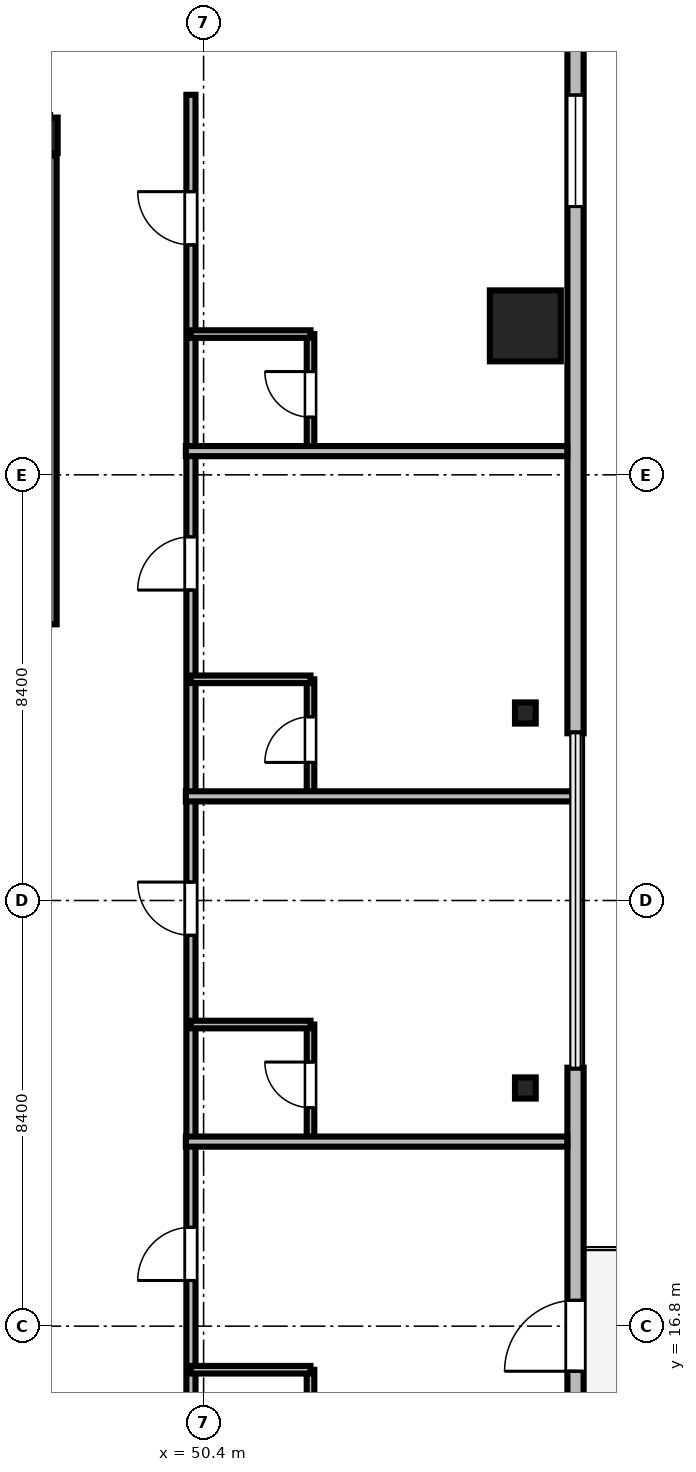
"""IFC4 building model, lengths in metres.
Left out: names, types, materials, properties, quantities, classifications, styles, units other than length and angle.
Written with IfcOpenShell. Run it as: python <this file> out.ifc"""

import sys

from ifc_helpers import new_model, si_unit, direction, frame, frame_2d, origin, origin_2d, place, context, subcontext, project, spatial, rectangle, i_section, extrude, source, transform, mapped, element, fill, save


model = new_model("IFC4")
c1 = context("Model", 3, precision=1e-05, world=origin(), true_north=direction((0.0, 1.0)))
c2 = subcontext(c1, "Body", "Model", "MODEL_VIEW")
j1 = project(units=[si_unit("LENGTHUNIT", "METRE"), si_unit("PLANEANGLEUNIT", "RADIAN")], contexts=[c1])
p1 = place(None, origin())
s1 = spatial("IfcSite", under=j1, at=p1, CompositionType="ELEMENT")
p2 = place(p1, origin())
s2 = spatial("IfcBuilding", under=s1, at=p2, CompositionType="ELEMENT")
p3 = place(p2, frame((0.0, 0.0, 229.8)))
s3 = spatial("IfcBuildingStorey", under=s2, at=p3, CompositionType="ELEMENT", Elevation=229.8)
m1 = source(origin(), c2, "Body", "SweptSolid", [
    extrude(i_section(OverallWidth=0.3, OverallDepth=0.7, WebThickness=0.017, FlangeThickness=0.032, FilletRadius=0.027, at=origin_2d()), origin(), (0.0, 0.0, 1.0), 3.53),
])
p4 = place(p3, frame((47.37, 40.3, 0.0), z_axis=(0.0, 0.0, 1.0), x_axis=(1.0, 0.0, 0.0)))
e1 = element("IfcColumn", 1, at=p4, inside=s3, PredefinedType="COLUMN", context=c2, shape_type="MappedRepresentation", body=[
    mapped(m1, transform((0.0, 0.0, 0.0), scale=1.0)),
])
m2 = source(origin(), c2, "Body", "SweptSolid", [
    extrude(rectangle(XDim=1.4, YDim=1.4, at=origin_2d()), origin(), (0.0, 0.0, 1.0), 3.53),
])
p5 = place(p3, frame((56.75, 36.54, 0.0), z_axis=(0.0, 0.0, 1.0), x_axis=(1.0, 0.0, 0.0)))
e2 = element("IfcColumn", 2, at=p5, inside=s3, PredefinedType="COLUMN", context=c2, shape_type="MappedRepresentation", body=[
    mapped(m2, transform((0.0, 0.0, 0.0), scale=1.0)),
])
m3 = source(origin(), c2, "Body", "SweptSolid", [
    extrude(i_section(OverallWidth=0.409, OverallDepth=0.417, WebThickness=0.021, FlangeThickness=0.033, FilletRadius=0.015, at=origin_2d()), origin(), (0.0, 0.0, 1.0), 3.53),
])
for number, where, z_axis, x_axis in (
    (3, (56.75, 21.5, 0.0), (0.0, 0.0, 1.0), (1.0, 0.0, 0.0)),
    (4, (56.75, 28.9, 0.0), (0.0, 0.0, 1.0), (1.0, 0.0, 0.0)),
):
    element("IfcColumn", number, at=place(p3, frame(where, z_axis=z_axis, x_axis=x_axis)), inside=s3, PredefinedType="COLUMN", context=c2, shape_type="MappedRepresentation", body=[
        mapped(m3, transform((0.0, 0.0, 0.0), scale=1.0)),
    ])
m4 = source(origin(), c2, "Body", "SweptSolid", [
    extrude(rectangle(XDim=15.6, YDim=0.32, at=frame_2d((7.8, 0.0))), origin(), (0.0, 0.0, 1.0), 3.53),
])
p6 = place(p3, frame((57.74, 6.3, 0.0), z_axis=(0.0, 0.0, 1.0), x_axis=(0.0, 1.0, 0.0)))
e5 = element("IfcWall", 5, at=p6, inside=s3, PredefinedType="SOLIDWALL", context=c2, shape_type="MappedRepresentation", body=[
    mapped(m4, transform((0.0, 0.0, 0.0), scale=1.0)),
])
m5 = source(origin(), c2, "Body", "SweptSolid", [
    extrude(rectangle(XDim=1.4, YDim=2.3, at=frame_2d((0.7, 1.15))), frame((0.0, 0.17, 0.0), z_axis=(0.0, -1.0, 0.0), x_axis=(1.0, 0.0, 0.0)), (0.0, 0.0, 1.0), 0.34),
])
p7 = place(p6, frame((9.61, 0.0, 0.0)))
e6 = element("IfcOpeningElement", 6, at=p7, cuts=e5, PredefinedType="OPENING", context=c2, shape_type="MappedRepresentation", body=[
    mapped(m5, transform((0.0, 0.0, 0.0), scale=1.0)),
])
m6 = source(origin(), c2, "Body", "SweptSolid", [
    extrude(rectangle(XDim=2.2, YDim=2.4, at=frame_2d((1.1, 1.2))), frame((0.0, 0.17, 0.0), z_axis=(0.0, -1.0, 0.0), x_axis=(1.0, 0.0, 0.0)), (0.0, 0.0, 1.0), 0.34),
])
p8 = place(p6, frame((3.005, 0.0, 0.72)))
e7 = element("IfcOpeningElement", 7, at=p8, cuts=e5, PredefinedType="OPENING", context=c2, shape_type="MappedRepresentation", body=[
    mapped(m6, transform((0.0, 0.0, 0.0), scale=1.0)),
])
m7 = source(origin(), c2, "Body", "SweptSolid", [
    extrude(rectangle(XDim=15.6, YDim=0.32, at=frame_2d((7.8, 0.0))), origin(), (0.0, 0.0, 1.0), 3.53),
])
p9 = place(p3, frame((57.74, 28.5, 0.0), z_axis=(0.0, 0.0, 1.0), x_axis=(0.0, 1.0, 0.0)))
e8 = element("IfcWall", 8, at=p9, inside=s3, PredefinedType="SOLIDWALL", context=c2, shape_type="MappedRepresentation", body=[
    mapped(m7, transform((0.0, 0.0, 0.0), scale=1.0)),
])
p10 = place(p9, frame((10.395, 0.0, 0.72)))
e9 = element("IfcOpeningElement", 9, at=p10, cuts=e8, PredefinedType="OPENING", context=c2, shape_type="MappedRepresentation", body=[
    mapped(m6, transform((0.0, 0.0, 0.0), scale=1.0)),
])
m8 = source(origin(), c2, "Body", "SweptSolid", [
    extrude(rectangle(XDim=9.25, YDim=0.25, at=frame_2d((4.625, 0.0))), origin(), (0.0, 0.0, 1.0), 3.55),
])
p11 = place(p3, frame((47.375, 30.65, 0.0), z_axis=(0.0, 0.0, 1.0), x_axis=(0.0, 1.0, 0.0)))
e10 = element("IfcWall", 10, at=p11, inside=s3, PredefinedType="SOLIDWALL", context=c2, shape_type="MappedRepresentation", body=[
    mapped(m8, transform((0.0, 0.0, 0.0), scale=1.0)),
])
m9 = source(origin(), c2, "Body", "SweptSolid", [
    extrude(rectangle(XDim=27.47, YDim=0.18, at=frame_2d((13.735, 0.0))), origin(), (0.0, 0.0, 1.0), 2.972),
])
p12 = place(p3, frame((50.15, 13.63, 0.0), z_axis=(0.0, 0.0, 1.0), x_axis=(0.0, 1.0, 0.0)))
e11 = element("IfcWall", 11, at=p12, inside=s3, PredefinedType="PARTITIONING", context=c2, shape_type="MappedRepresentation", body=[
    mapped(m9, transform((0.0, 0.0, 0.0), scale=1.0)),
])
m10 = source(origin(), c2, "Body", "SweptSolid", [
    extrude(rectangle(XDim=1.05, YDim=2.2, at=frame_2d((0.525, 1.1))), frame((0.0, 0.1, 0.0), z_axis=(0.0, -1.0, 0.0), x_axis=(1.0, 0.0, 0.0)), (0.0, 0.0, 1.0), 0.2),
])
p13 = place(p12, frame((4.071, 0.0, 0.0)))
e12 = element("IfcOpeningElement", 12, at=p13, cuts=e11, PredefinedType="OPENING", context=c2, shape_type="MappedRepresentation", body=[
    mapped(m10, transform((0.0, 0.0, 0.0), scale=1.0)),
])
p14 = place(p12, frame((10.884, 0.0, 0.0)))
e13 = element("IfcOpeningElement", 13, at=p14, cuts=e11, PredefinedType="OPENING", context=c2, shape_type="MappedRepresentation", body=[
    mapped(m10, transform((0.0, 0.0, 0.0), scale=1.0)),
])
p15 = place(p12, frame((17.696, 0.0, 0.0)))
e14 = element("IfcOpeningElement", 14, at=p15, cuts=e11, PredefinedType="OPENING", context=c2, shape_type="MappedRepresentation", body=[
    mapped(m10, transform((0.0, 0.0, 0.0), scale=1.0)),
])
p16 = place(p12, frame((24.509, 0.0, 0.0)))
e15 = element("IfcOpeningElement", 15, at=p16, cuts=e11, PredefinedType="OPENING", context=c2, shape_type="MappedRepresentation", body=[
    mapped(m10, transform((0.0, 0.0, 0.0), scale=1.0)),
])
m11 = source(origin(), c2, "Body", "SweptSolid", [
    extrude(rectangle(XDim=2.29, YDim=0.15, at=frame_2d((1.145, 0.0))), origin(), (0.0, 0.0, 1.0), 2.972),
])
p17 = place(p3, frame((52.51, 13.65, 0.0), z_axis=(0.0, 0.0, 1.0), x_axis=(0.0, 1.0, 0.0)))
e16 = element("IfcWall", 16, at=p17, inside=s3, PredefinedType="PARTITIONING", context=c2, shape_type="MappedRepresentation", body=[
    mapped(m11, transform((0.0, 0.0, 0.0), scale=1.0)),
])
m12 = source(origin(), c2, "Body", "SweptSolid", [
    extrude(rectangle(XDim=0.9, YDim=2.1, at=frame_2d((0.45, 1.05))), frame((0.0, 0.085, 0.0), z_axis=(0.0, -1.0, 0.0), x_axis=(1.0, 0.0, 0.0)), (0.0, 0.0, 1.0), 0.17),
])
p18 = place(p17, frame((0.65, 0.0, 0.0)))
e17 = element("IfcOpeningElement", 17, at=p18, cuts=e16, PredefinedType="OPENING", context=c2, shape_type="MappedRepresentation", body=[
    mapped(m12, transform((0.0, 0.0, 0.0), scale=1.0)),
])
m13 = source(origin(), c2, "Body", "SweptSolid", [
    extrude(rectangle(XDim=2.29, YDim=0.15, at=frame_2d((1.145, 0.0))), origin(), (0.0, 0.0, 1.0), 3.53),
])
p19 = place(p3, frame((52.51, 20.462, 0.0), z_axis=(0.0, 0.0, 1.0), x_axis=(0.0, 1.0, 0.0)))
e18 = element("IfcWall", 18, at=p19, inside=s3, PredefinedType="PARTITIONING", context=c2, shape_type="MappedRepresentation", body=[
    mapped(m13, transform((0.0, 0.0, 0.0), scale=1.0)),
])
p20 = place(p19, frame((0.65, 0.0, 0.0)))
e19 = element("IfcOpeningElement", 19, at=p20, cuts=e18, PredefinedType="OPENING", context=c2, shape_type="MappedRepresentation", body=[
    mapped(m12, transform((0.0, 0.0, 0.0), scale=1.0)),
])
p21 = place(p3, frame((52.51, 27.275, 0.0), z_axis=(0.0, 0.0, 1.0), x_axis=(0.0, 1.0, 0.0)))
e20 = element("IfcWall", 20, at=p21, inside=s3, PredefinedType="PARTITIONING", context=c2, shape_type="MappedRepresentation", body=[
    mapped(m11, transform((0.0, 0.0, 0.0), scale=1.0)),
])
p22 = place(p21, frame((0.65, 0.0, 0.0)))
e21 = element("IfcOpeningElement", 21, at=p22, cuts=e20, PredefinedType="OPENING", context=c2, shape_type="MappedRepresentation", body=[
    mapped(m12, transform((0.0, 0.0, 0.0), scale=1.0)),
])
p23 = place(p3, frame((52.51, 34.088, 0.0), z_axis=(0.0, 0.0, 1.0), x_axis=(0.0, 1.0, 0.0)))
e22 = element("IfcWall", 22, at=p23, inside=s3, PredefinedType="PARTITIONING", context=c2, shape_type="MappedRepresentation", body=[
    mapped(m13, transform((0.0, 0.0, 0.0), scale=1.0)),
])
p24 = place(p23, frame((0.65, 0.0, 0.0)))
e23 = element("IfcOpeningElement", 23, at=p24, cuts=e22, PredefinedType="OPENING", context=c2, shape_type="MappedRepresentation", body=[
    mapped(m12, transform((0.0, 0.0, 0.0), scale=1.0)),
])
m14 = source(origin(), c2, "Body", "SweptSolid", [
    extrude(rectangle(XDim=7.528, YDim=0.2, at=frame_2d((3.764, 0.0))), origin(), (0.0, 0.0, 1.0), 2.772),
])
p25 = place(p3, frame((50.05, 20.442, 0.0), z_axis=(0.0, 0.0, 1.0), x_axis=(1.0, 0.0, 0.0)))
e24 = element("IfcWall", 24, at=p25, inside=s3, PredefinedType="PARTITIONING", context=c2, shape_type="MappedRepresentation", body=[
    mapped(m14, transform((0.0, 0.0, 0.0), scale=1.0)),
])
m15 = source(origin(), c2, "Body", "SweptSolid", [
    extrude(rectangle(XDim=7.72, YDim=0.2, at=frame_2d((3.86, 0.0))), origin(), (0.0, 0.0, 1.0), 2.772),
])
p26 = place(p3, frame((50.05, 27.255, 0.0), z_axis=(0.0, 0.0, 1.0), x_axis=(1.0, 0.0, 0.0)))
e25 = element("IfcWall", 25, at=p26, inside=s3, PredefinedType="PARTITIONING", context=c2, shape_type="MappedRepresentation", body=[
    mapped(m15, transform((0.0, 0.0, 0.0), scale=1.0)),
])
p27 = place(p3, frame((50.05, 34.068, 0.0), z_axis=(0.0, 0.0, 1.0), x_axis=(1.0, 0.0, 0.0)))
e26 = element("IfcWall", 26, at=p27, inside=s3, PredefinedType="PARTITIONING", context=c2, shape_type="MappedRepresentation", body=[
    mapped(m14, transform((0.0, 0.0, 0.0), scale=1.0)),
])
m16 = source(origin(), c2, "Body", "SweptSolid", [
    extrude(rectangle(XDim=2.36, YDim=0.15, at=frame_2d((1.18, 0.0))), origin(), (0.0, 0.0, 1.0), 3.53),
])
for number, where, z_axis, x_axis in (
    (27, (50.15, 15.94, 0.0), (0.0, 0.0, 1.0), (1.0, 0.0, 0.0)),
    (28, (50.15, 22.752, 0.0), (0.0, 0.0, 1.0), (1.0, 0.0, 0.0)),
    (29, (50.15, 29.565, 0.0), (0.0, 0.0, 1.0), (1.0, 0.0, 0.0)),
    (30, (50.15, 36.378, 0.0), (0.0, 0.0, 1.0), (1.0, 0.0, 0.0)),
):
    element("IfcWall", number, at=place(p3, frame(where, z_axis=z_axis, x_axis=x_axis)), inside=s3, PredefinedType="PARTITIONING", context=c2, shape_type="MappedRepresentation", body=[
        mapped(m16, transform((0.0, 0.0, 0.0), scale=1.0)),
    ])
m17 = source(origin(), c2, "Body", "SweptSolid", [
    extrude(rectangle(XDim=1.4, YDim=2.3, at=frame_2d((0.7, 1.15))), frame((0.0, 0.025, 0.0), z_axis=(0.0, -1.0, 0.0), x_axis=(1.0, 0.0, 0.0)), (0.0, 0.0, 1.0), 0.05),
])
p28 = place(p7, frame((1.4, 0.0, 0.0), z_axis=(0.0, 0.0, 1.0), x_axis=(-1.0, 0.0, 0.0)))
e31 = element("IfcDoor", 31, at=p28, inside=s3, OperationType="DOUBLE_DOOR_SLIDING", PredefinedType="DOOR", context=c2, shape_type="MappedRepresentation", body=[
    mapped(m17, transform((0.0, 0.0, 0.0), scale=1.0)),
])
fill(e6, e31)
m18 = source(origin(), c2, "Body", "SweptSolid", [
    extrude(rectangle(XDim=2.2, YDim=2.4, at=frame_2d((1.1, 1.2))), frame((0.0, 0.03, 0.0), z_axis=(0.0, -1.0, 0.0), x_axis=(1.0, 0.0, 0.0)), (0.0, 0.0, 1.0), 0.06),
])
p29 = place(p10, origin())
e32 = element("IfcWindow", 32, at=p29, inside=s3, PartitioningType="SINGLE_PANEL", PredefinedType="WINDOW", context=c2, shape_type="MappedRepresentation", body=[
    mapped(m18, transform((0.0, 0.0, 0.0), scale=1.0)),
])
fill(e9, e32)
m19 = source(origin(), c2, "Body", "SweptSolid", [
    extrude(rectangle(XDim=1.05, YDim=2.2, at=frame_2d((0.525, 1.1))), frame((0.0, 0.025, 0.0), z_axis=(0.0, -1.0, 0.0), x_axis=(1.0, 0.0, 0.0)), (0.0, 0.0, 1.0), 0.05),
])
p30 = place(p13, origin())
e33 = element("IfcDoor", 33, at=p30, inside=s3, OperationType="SINGLE_SWING_LEFT", PredefinedType="DOOR", context=c2, shape_type="MappedRepresentation", body=[
    mapped(m19, transform((0.0, 0.0, 0.0), scale=1.0)),
])
fill(e12, e33)
p31 = place(p14, origin())
e34 = element("IfcDoor", 34, at=p31, inside=s3, OperationType="SINGLE_SWING_RIGHT", PredefinedType="DOOR", context=c2, shape_type="MappedRepresentation", body=[
    mapped(m19, transform((0.0, 0.0, 0.0), scale=1.0)),
])
fill(e13, e34)
p32 = place(p15, origin())
e35 = element("IfcDoor", 35, at=p32, inside=s3, OperationType="SINGLE_SWING_LEFT", PredefinedType="DOOR", context=c2, shape_type="MappedRepresentation", body=[
    mapped(m19, transform((0.0, 0.0, 0.0), scale=1.0)),
])
fill(e14, e35)
p33 = place(p16, origin())
e36 = element("IfcDoor", 36, at=p33, inside=s3, OperationType="SINGLE_SWING_RIGHT", PredefinedType="DOOR", context=c2, shape_type="MappedRepresentation", body=[
    mapped(m19, transform((0.0, 0.0, 0.0), scale=1.0)),
])
fill(e15, e36)
m20 = source(origin(), c2, "Body", "SweptSolid", [
    extrude(rectangle(XDim=0.9, YDim=2.1, at=frame_2d((0.45, 1.05))), frame((0.0, 0.025, 0.0), z_axis=(0.0, -1.0, 0.0), x_axis=(1.0, 0.0, 0.0)), (0.0, 0.0, 1.0), 0.05),
])
p34 = place(p20, origin())
e37 = element("IfcDoor", 37, at=p34, inside=s3, OperationType="SINGLE_SWING_RIGHT", PredefinedType="DOOR", context=c2, shape_type="MappedRepresentation", body=[
    mapped(m20, transform((0.0, 0.0, 0.0), scale=1.0)),
])
fill(e19, e37)
p35 = place(p22, origin())
e38 = element("IfcDoor", 38, at=p35, inside=s3, OperationType="SINGLE_SWING_LEFT", PredefinedType="DOOR", context=c2, shape_type="MappedRepresentation", body=[
    mapped(m20, transform((0.0, 0.0, 0.0), scale=1.0)),
])
fill(e21, e38)
p36 = place(p24, origin())
e39 = element("IfcDoor", 39, at=p36, inside=s3, OperationType="SINGLE_SWING_RIGHT", PredefinedType="DOOR", context=c2, shape_type="MappedRepresentation", body=[
    mapped(m20, transform((0.0, 0.0, 0.0), scale=1.0)),
])
fill(e23, e39)
save(model, sys.argv[1])
